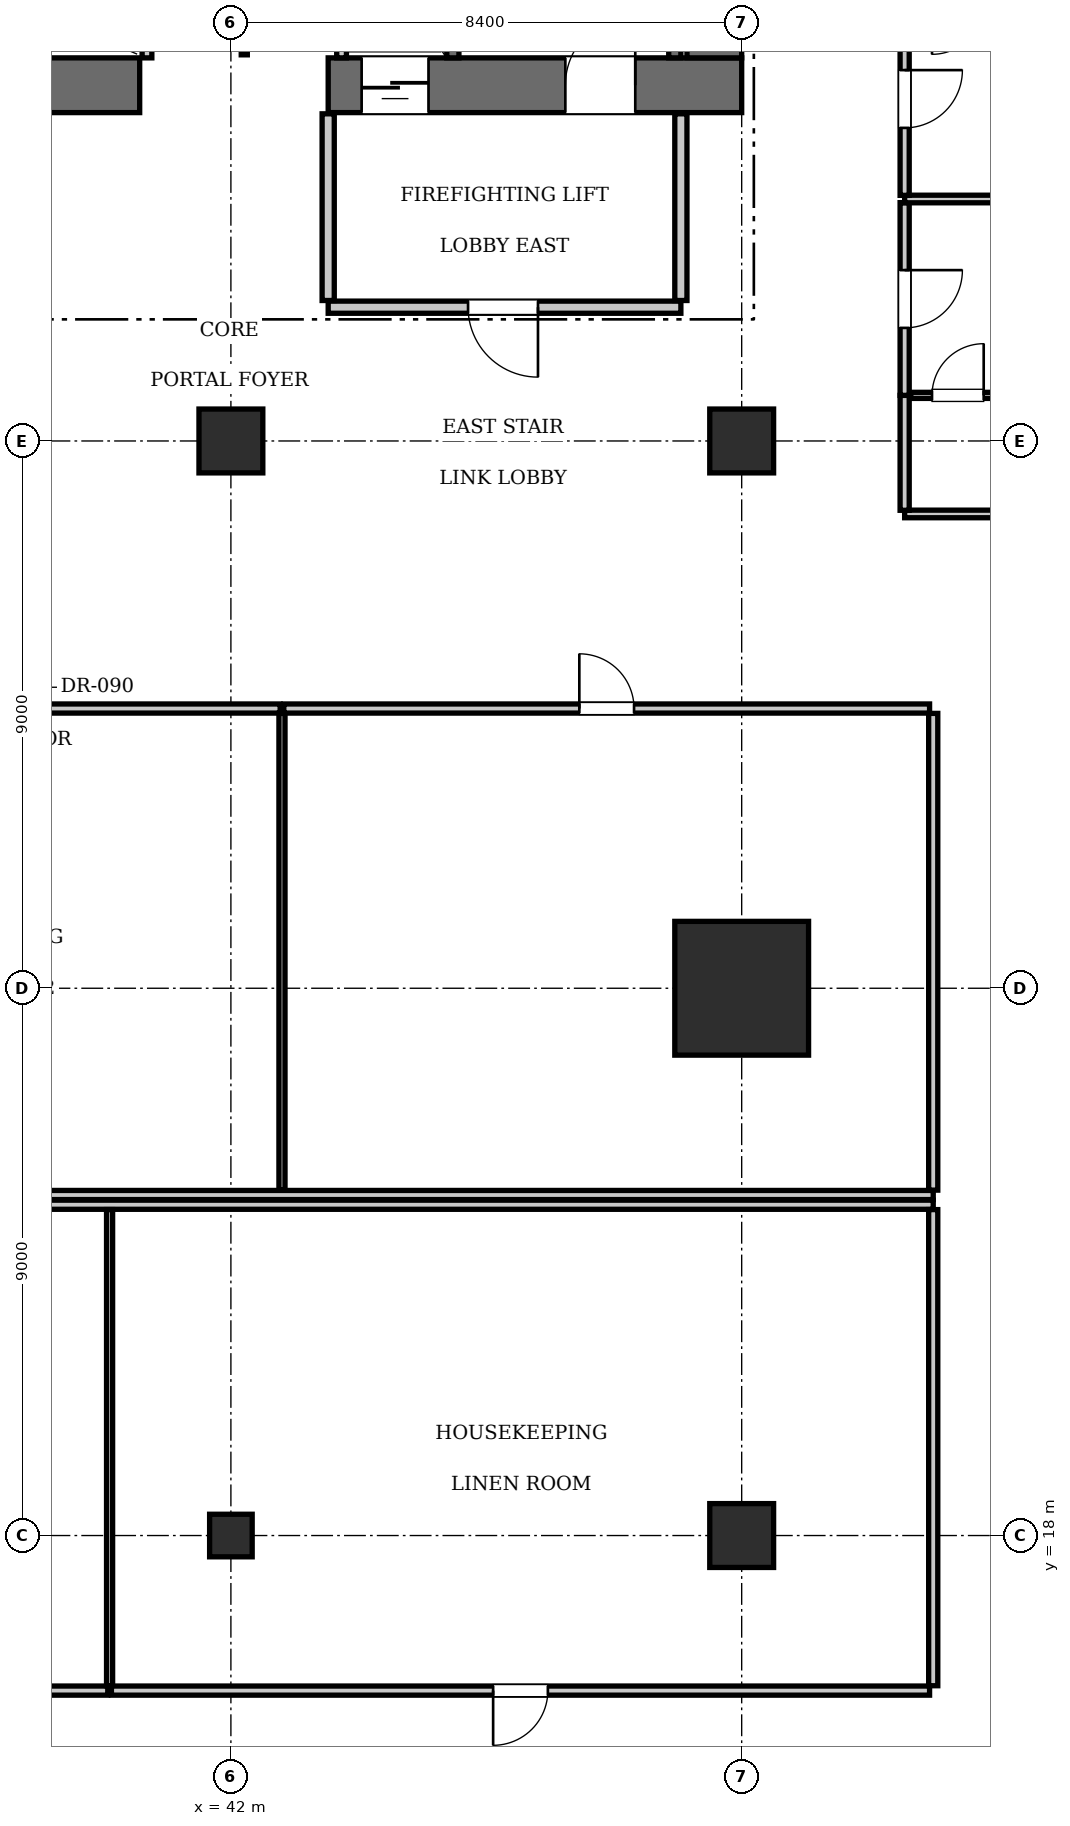
"""IFC4 building model, lengths in metres.
Left out: names, types, materials, properties, quantities, classifications, styles, units other than length and angle.
Written with IfcOpenShell. Run it as: python <this file> out.ifc"""

import sys

from ifc_helpers import new_model, si_unit, direction, frame, frame_2d, origin, origin_2d, place, context, subcontext, project, spatial, rectangle, i_section, extrude, element, fill, save


model = new_model("IFC4")
c1 = context("Model", 3, precision=1e-05, world=origin(), true_north=direction((0.0, 1.0)))
c2 = subcontext(c1, "Body", "Model", "MODEL_VIEW")
j1 = project(units=[si_unit("LENGTHUNIT", "METRE"), si_unit("PLANEANGLEUNIT", "RADIAN")], contexts=[c1])
p1 = place(None, origin())
s1 = spatial("IfcSite", under=j1, at=p1, CompositionType="ELEMENT")
p2 = place(p1, origin())
s2 = spatial("IfcBuilding", under=s1, at=p2, CompositionType="ELEMENT")
p3 = place(p2, frame((0.0, 0.0, 80.85)))
s3 = spatial("IfcBuildingStorey", under=s2, at=p3, CompositionType="ELEMENT", Elevation=80.85)
p4 = place(p3, frame((50.4, 27.0, 0.0), z_axis=(0.0, 0.0, 1.0), x_axis=(1.0, 0.0, 0.0)))
e1 = element("IfcColumn", 1, at=p4, inside=s3, PredefinedType="COLUMN", context=c2, shape_type="SweptSolid", body=[
    extrude(rectangle(XDim=2.2, YDim=2.2, at=origin_2d()), origin(), (0.0, 0.0, 1.0), 3.85),
])
p5 = place(p3, frame((35.1, 41.85, 0.0), z_axis=(0.0, 0.0, 1.0), x_axis=(1.0, 0.0, 0.0)))
e2 = element("IfcWall", 2, at=p5, inside=s3, PredefinedType="SHEAR", context=c2, shape_type="SweptSolid", body=[
    extrude(rectangle(XDim=5.4, YDim=0.9, at=frame_2d((2.7, 0.0))), origin(), (0.0, 0.0, 1.0), 3.85),
])
p6 = place(p3, frame((43.6, 41.85, 0.0), z_axis=(0.0, 0.0, 1.0), x_axis=(1.0, 0.0, 0.0)))
e3 = element("IfcWall", 3, at=p6, inside=s3, PredefinedType="SHEAR", context=c2, shape_type="SweptSolid", body=[
    extrude(rectangle(XDim=6.8, YDim=0.9, at=frame_2d((3.4, 0.0))), origin(), (0.0, 0.0, 1.0), 3.85),
])
p7 = place(p6, frame((3.9, 0.0, 0.0)))
e4 = element("IfcOpeningElement", 4, at=p7, cuts=e3, PredefinedType="OPENING", context=c2, shape_type="SweptSolid", body=[
    extrude(rectangle(XDim=1.15, YDim=2.15, at=frame_2d((0.575, 1.075))), frame((0.0, 0.46, 0.0), z_axis=(0.0, -1.0, 0.0), x_axis=(1.0, 0.0, 0.0)), (0.0, 0.0, 1.0), 0.92),
])
p8 = place(p6, frame((0.55, 0.0, 0.0)))
e5 = element("IfcOpeningElement", 5, at=p8, cuts=e3, PredefinedType="OPENING", context=c2, shape_type="SweptSolid", body=[
    extrude(rectangle(XDim=1.1, YDim=2.2, at=frame_2d((0.55, 1.1))), frame((0.0, 0.46, 0.0), z_axis=(0.0, -1.0, 0.0), x_axis=(1.0, 0.0, 0.0)), (0.0, 0.0, 1.0), 0.92),
])
p9 = place(p3, frame((49.95, 42.3, 0.0), z_axis=(0.0, 0.0, 1.0), x_axis=(0.0, 1.0, 0.0)))
e6 = element("IfcWall", 6, at=p9, inside=s3, PredefinedType="SHEAR", context=c2, shape_type="SweptSolid", body=[
    extrude(rectangle(XDim=1.6, YDim=0.9, at=frame_2d((0.8, 0.0))), origin(), (0.0, 0.0, 1.0), 3.85),
])
for number, where, z_axis, x_axis in (
    (7, (42.0, 36.0, 0.0), (0.0, 0.0, 1.0), (1.0, 0.0, 0.0)),
    (8, (50.4, 36.0, 0.0), (0.0, 0.0, 1.0), (1.0, 0.0, 0.0)),
    (9, (50.4, 18.0, 0.0), (0.0, 0.0, 1.0), (1.0, 0.0, 0.0)),
):
    element("IfcColumn", number, at=place(p3, frame(where, z_axis=z_axis, x_axis=x_axis)), inside=s3, PredefinedType="COLUMN", context=c2, shape_type="SweptSolid", body=[
        extrude(rectangle(XDim=1.05, YDim=1.05, at=origin_2d()), origin(), (0.0, 0.0, 1.0), 3.85),
    ])
p10 = place(p3, frame((42.0, 18.0, 0.0), z_axis=(0.0, 0.0, 1.0), x_axis=(1.0, 0.0, 0.0)))
e10 = element("IfcColumn", 10, at=p10, inside=s3, PredefinedType="COLUMN", context=c2, shape_type="SweptSolid", body=[
    extrude(i_section(OverallWidth=0.7, OverallDepth=0.7, WebThickness=0.028, FlangeThickness=0.044, at=origin_2d()), origin(), (0.0, 0.0, 1.0), 3.85),
])
p11 = place(p3, frame((45.65, 42.3, 0.0), z_axis=(0.0, 0.0, 1.0), x_axis=(0.0, 1.0, 0.0)))
e11 = element("IfcWall", 11, at=p11, inside=s3, PredefinedType="SOLIDWALL", context=c2, shape_type="SweptSolid", body=[
    extrude(rectangle(XDim=8.85, YDim=0.2, at=frame_2d((4.425, 0.0))), origin(), (0.0, 0.0, 1.0), 3.61),
])
p12 = place(p3, frame((49.3, 42.3, 0.0), z_axis=(0.0, 0.0, 1.0), x_axis=(0.0, 1.0, 0.0)))
e12 = element("IfcWall", 12, at=p12, inside=s3, PredefinedType="SOLIDWALL", context=c2, shape_type="SweptSolid", body=[
    extrude(rectangle(XDim=1.58, YDim=0.2, at=frame_2d((0.79, 0.0))), origin(), (0.0, 0.0, 1.0), 3.61),
])
p13 = place(p3, frame((43.82, 42.3, 0.0), z_axis=(0.0, 0.0, 1.0), x_axis=(0.0, 1.0, 0.0)))
e13 = element("IfcWall", 13, at=p13, inside=s3, PredefinedType="SOLIDWALL", context=c2, shape_type="SweptSolid", body=[
    extrude(rectangle(XDim=2.44, YDim=0.16, at=frame_2d((1.22, 0.0))), origin(), (0.0, 0.0, 1.0), 3.61),
])
p14 = place(p3, frame((40.62, 42.3, 0.0), z_axis=(0.0, 0.0, 1.0), x_axis=(0.0, 1.0, 0.0)))
e14 = element("IfcWall", 14, at=p14, inside=s3, PredefinedType="SOLIDWALL", context=c2, shape_type="SweptSolid", body=[
    extrude(rectangle(XDim=2.05, YDim=0.16, at=frame_2d((1.025, 0.0))), origin(), (0.0, 0.0, 1.0), 3.61),
])
p15 = place(p3, frame((43.6, 38.2, 0.0), z_axis=(0.0, 0.0, 1.0), x_axis=(1.0, 0.0, 0.0)))
e15 = element("IfcWall", 15, at=p15, inside=s3, PredefinedType="PARTITIONING", context=c2, shape_type="SweptSolid", body=[
    extrude(rectangle(XDim=5.8, YDim=0.2, at=frame_2d((2.9, 0.0))), origin(), (0.0, 0.0, 1.0), 3.61),
])
p16 = place(p15, frame((2.3, 0.0, 0.0)))
e16 = element("IfcOpeningElement", 16, at=p16, cuts=e15, PredefinedType="OPENING", context=c2, shape_type="SweptSolid", body=[
    extrude(rectangle(XDim=1.15, YDim=2.15, at=frame_2d((0.575, 1.075))), frame((0.0, 0.11, 0.0), z_axis=(0.0, -1.0, 0.0), x_axis=(1.0, 0.0, 0.0)), (0.0, 0.0, 1.0), 0.22),
])
for number, where, z_axis, x_axis in (
    (17, (43.6, 38.31, 0.0), (0.0, 0.0, 1.0), (0.0, 1.0, 0.0)),
    (18, (49.4, 38.31, 0.0), (0.0, 0.0, 1.0), (0.0, 1.0, 0.0)),
):
    element("IfcWall", number, at=place(p3, frame(where, z_axis=z_axis, x_axis=x_axis)), inside=s3, PredefinedType="PARTITIONING", context=c2, shape_type="SweptSolid", body=[
        extrude(rectangle(XDim=3.07, YDim=0.2, at=frame_2d((1.535, 0.0))), origin(), (0.0, 0.0, 1.0), 3.61),
    ])
p17 = place(p3, frame((42.22, 42.35, 0.0), z_axis=(0.0, 0.0, 1.0), x_axis=(0.0, 1.0, 0.0)))
e19 = element("IfcWall", 19, at=p17, inside=s3, PredefinedType="PARTITIONING", context=c2, shape_type="SweptSolid", body=[
    extrude(rectangle(XDim=2.61, YDim=0.1, at=frame_2d((1.305, 0.0))), origin(), (0.0, 0.0, 1.0), 3.61),
])
p18 = place(p17, frame((0.65, 0.0, 0.0)))
e20 = element("IfcOpeningElement", 20, at=p18, cuts=e19, PredefinedType="OPENING", context=c2, shape_type="SweptSolid", body=[
    extrude(rectangle(XDim=0.8, YDim=2.05, at=frame_2d((0.4, 1.025))), frame((0.0, 0.06, 0.0), z_axis=(0.0, -1.0, 0.0), x_axis=(1.0, 0.0, 0.0)), (0.0, 0.0, 1.0), 0.12),
])
p19 = place(p3, frame((22.05, 23.6, 0.0), z_axis=(0.0, 0.0, 1.0), x_axis=(1.0, 0.0, 0.0)))
e21 = element("IfcWall", 21, at=p19, inside=s3, PredefinedType="PARTITIONING", context=c2, shape_type="SweptSolid", body=[
    extrude(rectangle(XDim=31.5, YDim=0.15, at=frame_2d((15.75, 0.0))), origin(), (0.0, 0.0, 1.0), 3.61),
])
p20 = place(p3, frame((53.55, 23.68, 0.0), z_axis=(0.0, 0.0, 1.0), x_axis=(0.0, 1.0, 0.0)))
e22 = element("IfcWall", 22, at=p20, inside=s3, PredefinedType="PARTITIONING", context=c2, shape_type="SweptSolid", body=[
    extrude(rectangle(XDim=7.84, YDim=0.15, at=frame_2d((3.92, 0.0))), origin(), (0.0, 0.0, 1.0), 3.61),
])
p21 = place(p3, frame((34.05, 31.6, 0.0), z_axis=(0.0, 0.0, 1.0), x_axis=(1.0, 0.0, 0.0)))
e23 = element("IfcWall", 23, at=p21, inside=s3, PredefinedType="PARTITIONING", context=c2, shape_type="SweptSolid", body=[
    extrude(rectangle(XDim=8.76, YDim=0.15, at=frame_2d((4.38, 0.0))), origin(), (0.0, 0.0, 1.0), 3.61),
])
p22 = place(p21, frame((3.93, 0.0, 0.0)))
e24 = element("IfcOpeningElement", 24, at=p22, cuts=e23, PredefinedType="OPENING", context=c2, shape_type="SweptSolid", body=[
    extrude(rectangle(XDim=0.9, YDim=2.1, at=frame_2d((0.45, 1.05))), frame((0.0, 0.085, 0.0), z_axis=(0.0, -1.0, 0.0), x_axis=(1.0, 0.0, 0.0)), (0.0, 0.0, 1.0), 0.17),
])
p23 = place(p3, frame((42.84, 23.68, 0.0), z_axis=(0.0, 0.0, 1.0), x_axis=(0.0, 1.0, 0.0)))
e25 = element("IfcWall", 25, at=p23, inside=s3, PredefinedType="PARTITIONING", context=c2, shape_type="SweptSolid", body=[
    extrude(rectangle(XDim=7.84, YDim=0.1, at=frame_2d((3.92, 0.0))), origin(), (0.0, 0.0, 1.0), 3.61),
])
p24 = place(p3, frame((42.87, 31.6, 0.0), z_axis=(0.0, 0.0, 1.0), x_axis=(1.0, 0.0, 0.0)))
e26 = element("IfcWall", 26, at=p24, inside=s3, PredefinedType="PARTITIONING", context=c2, shape_type="SweptSolid", body=[
    extrude(rectangle(XDim=10.62, YDim=0.15, at=frame_2d((5.31, 0.0))), origin(), (0.0, 0.0, 1.0), 3.61),
])
p25 = place(p24, frame((4.86, 0.0, 0.0)))
e27 = element("IfcOpeningElement", 27, at=p25, cuts=e26, PredefinedType="OPENING", context=c2, shape_type="SweptSolid", body=[
    extrude(rectangle(XDim=0.9, YDim=2.1, at=frame_2d((0.45, 1.05))), frame((0.0, 0.085, 0.0), z_axis=(0.0, -1.0, 0.0), x_axis=(1.0, 0.0, 0.0)), (0.0, 0.0, 1.0), 0.17),
])
p26 = place(p3, frame((22.05, 23.44, 0.0), z_axis=(0.0, 0.0, 1.0), x_axis=(1.0, 0.0, 0.0)))
e28 = element("IfcWall", 28, at=p26, inside=s3, PredefinedType="PARTITIONING", context=c2, shape_type="SweptSolid", body=[
    extrude(rectangle(XDim=31.5, YDim=0.15, at=frame_2d((15.75, 0.0))), origin(), (0.0, 0.0, 1.0), 3.61),
])
p27 = place(p3, frame((53.55, 15.53, 0.0), z_axis=(0.0, 0.0, 1.0), x_axis=(0.0, 1.0, 0.0)))
e29 = element("IfcWall", 29, at=p27, inside=s3, PredefinedType="PARTITIONING", context=c2, shape_type="SweptSolid", body=[
    extrude(rectangle(XDim=7.83, YDim=0.15, at=frame_2d((3.915, 0.0))), origin(), (0.0, 0.0, 1.0), 3.61),
])
p28 = place(p3, frame((29.325, 15.45, 0.0), z_axis=(0.0, 0.0, 1.0), x_axis=(1.0, 0.0, 0.0)))
e30 = element("IfcWall", 30, at=p28, inside=s3, PredefinedType="PARTITIONING", context=c2, shape_type="SweptSolid", body=[
    extrude(rectangle(XDim=10.65, YDim=0.15, at=frame_2d((5.325, 0.0))), origin(), (0.0, 0.0, 1.0), 3.61),
])
p29 = place(p28, frame((4.875, 0.0, 0.0)))
e31 = element("IfcOpeningElement", 31, at=p29, cuts=e30, PredefinedType="OPENING", context=c2, shape_type="SweptSolid", body=[
    extrude(rectangle(XDim=0.9, YDim=2.1, at=frame_2d((0.45, 1.05))), frame((0.0, 0.085, 0.0), z_axis=(0.0, -1.0, 0.0), x_axis=(1.0, 0.0, 0.0)), (0.0, 0.0, 1.0), 0.17),
])
p30 = place(p3, frame((40.005, 15.53, 0.0), z_axis=(0.0, 0.0, 1.0), x_axis=(0.0, 1.0, 0.0)))
e32 = element("IfcWall", 32, at=p30, inside=s3, PredefinedType="PARTITIONING", context=c2, shape_type="SweptSolid", body=[
    extrude(rectangle(XDim=7.83, YDim=0.1, at=frame_2d((3.915, 0.0))), origin(), (0.0, 0.0, 1.0), 3.61),
])
p31 = place(p3, frame((40.035, 15.45, 0.0), z_axis=(0.0, 0.0, 1.0), x_axis=(1.0, 0.0, 0.0)))
e33 = element("IfcWall", 33, at=p31, inside=s3, PredefinedType="PARTITIONING", context=c2, shape_type="SweptSolid", body=[
    extrude(rectangle(XDim=13.455, YDim=0.15, at=frame_2d((6.728, 0.0))), origin(), (0.0, 0.0, 1.0), 3.61),
])
p32 = place(p31, frame((6.278, 0.0, 0.0)))
e34 = element("IfcOpeningElement", 34, at=p32, cuts=e33, PredefinedType="OPENING", context=c2, shape_type="SweptSolid", body=[
    extrude(rectangle(XDim=0.9, YDim=2.1, at=frame_2d((0.45, 1.05))), frame((0.0, 0.085, 0.0), z_axis=(0.0, -1.0, 0.0), x_axis=(1.0, 0.0, 0.0)), (0.0, 0.0, 1.0), 0.17),
])
p33 = place(p3, frame((53.08, 34.8, 0.0), z_axis=(0.0, 0.0, 1.0), x_axis=(1.0, 0.0, 0.0)))
e35 = element("IfcWall", 35, at=p33, inside=s3, PredefinedType="PARTITIONING", context=c2, shape_type="SweptSolid", body=[
    extrude(rectangle(XDim=11.62, YDim=0.125, at=frame_2d((5.81, 0.0))), origin(), (0.0, 0.0, 1.0), 3.61),
])
p34 = place(p3, frame((53.08, 34.86, 0.0), z_axis=(0.0, 0.0, 1.0), x_axis=(0.0, 1.0, 0.0)))
e36 = element("IfcWall", 36, at=p34, inside=s3, PredefinedType="PARTITIONING", context=c2, shape_type="SweptSolid", body=[
    extrude(rectangle(XDim=1.89, YDim=0.15, at=frame_2d((0.945, 0.0))), origin(), (0.0, 0.0, 1.0), 3.61),
])
p35 = place(p3, frame((53.08, 36.75, 0.0), z_axis=(0.0, 0.0, 1.0), x_axis=(0.0, 1.0, 0.0)))
e37 = element("IfcWall", 37, at=p35, inside=s3, PredefinedType="PARTITIONING", context=c2, shape_type="SweptSolid", body=[
    extrude(rectangle(XDim=3.169, YDim=0.15, at=frame_2d((1.584, 0.0))), origin(), (0.0, 0.0, 1.0), 3.61),
])
p36 = place(p35, frame((1.11, 0.0, 0.0)))
e38 = element("IfcOpeningElement", 38, at=p36, cuts=e37, PredefinedType="OPENING", context=c2, shape_type="SweptSolid", body=[
    extrude(rectangle(XDim=0.95, YDim=2.15, at=frame_2d((0.475, 1.075))), frame((0.0, 0.085, 0.0), z_axis=(0.0, -1.0, 0.0), x_axis=(1.0, 0.0, 0.0)), (0.0, 0.0, 1.0), 0.17),
])
p37 = place(p3, frame((53.18, 36.75, 0.0), z_axis=(0.0, 0.0, 1.0), x_axis=(1.0, 0.0, 0.0)))
e39 = element("IfcWall", 39, at=p37, inside=s3, PredefinedType="PARTITIONING", context=c2, shape_type="SweptSolid", body=[
    extrude(rectangle(XDim=2.3, YDim=0.1, at=frame_2d((1.15, 0.0))), origin(), (0.0, 0.0, 1.0), 3.61),
])
p38 = place(p37, frame((0.35, 0.0, 0.0)))
e40 = element("IfcOpeningElement", 40, at=p38, cuts=e39, PredefinedType="OPENING", context=c2, shape_type="SweptSolid", body=[
    extrude(rectangle(XDim=0.85, YDim=2.1, at=frame_2d((0.425, 1.05))), frame((0.0, 0.06, 0.0), z_axis=(0.0, -1.0, 0.0), x_axis=(1.0, 0.0, 0.0)), (0.0, 0.0, 1.0), 0.12),
])
p39 = place(p3, frame((53.08, 39.979, 0.0), z_axis=(0.0, 0.0, 1.0), x_axis=(1.0, 0.0, 0.0)))
e41 = element("IfcWall", 41, at=p39, inside=s3, PredefinedType="PARTITIONING", context=c2, shape_type="SweptSolid", body=[
    extrude(rectangle(XDim=11.62, YDim=0.125, at=frame_2d((5.81, 0.0))), origin(), (0.0, 0.0, 1.0), 3.61),
])
p40 = place(p3, frame((53.08, 40.039, 0.0), z_axis=(0.0, 0.0, 1.0), x_axis=(0.0, 1.0, 0.0)))
e42 = element("IfcWall", 42, at=p40, inside=s3, PredefinedType="PARTITIONING", context=c2, shape_type="SweptSolid", body=[
    extrude(rectangle(XDim=3.169, YDim=0.15, at=frame_2d((1.584, 0.0))), origin(), (0.0, 0.0, 1.0), 3.61),
])
p41 = place(p40, frame((1.11, 0.0, 0.0)))
e43 = element("IfcOpeningElement", 43, at=p41, cuts=e42, PredefinedType="OPENING", context=c2, shape_type="SweptSolid", body=[
    extrude(rectangle(XDim=0.95, YDim=2.15, at=frame_2d((0.475, 1.075))), frame((0.0, 0.085, 0.0), z_axis=(0.0, -1.0, 0.0), x_axis=(1.0, 0.0, 0.0)), (0.0, 0.0, 1.0), 0.17),
])
p42 = place(p7, origin())
e44 = element("IfcDoor", 44, at=p42, inside=s3, OperationType="SINGLE_SWING_RIGHT", PredefinedType="DOOR", context=c2, shape_type="SweptSolid", body=[
    extrude(rectangle(XDim=1.15, YDim=2.15, at=frame_2d((0.575, 1.075))), frame((0.0, 0.025, 0.0), z_axis=(0.0, -1.0, 0.0), x_axis=(1.0, 0.0, 0.0)), (0.0, 0.0, 1.0), 0.05),
])
fill(e4, e44)
p43 = place(p8, frame((1.1, 0.0, 0.0), z_axis=(0.0, 0.0, 1.0), x_axis=(-1.0, 0.0, 0.0)))
e45 = element("IfcDoor", 45, at=p43, inside=s3, OperationType="SLIDING_TO_LEFT", PredefinedType="DOOR", context=c2, shape_type="SweptSolid", body=[
    extrude(rectangle(XDim=1.1, YDim=2.2, at=frame_2d((0.55, 1.1))), frame((0.0, 0.025, 0.0), z_axis=(0.0, -1.0, 0.0), x_axis=(1.0, 0.0, 0.0)), (0.0, 0.0, 1.0), 0.05),
])
fill(e5, e45)
p44 = place(p16, frame((1.15, 0.0, 0.0), z_axis=(0.0, 0.0, 1.0), x_axis=(-1.0, 0.0, 0.0)))
e46 = element("IfcDoor", 46, at=p44, inside=s3, OperationType="SINGLE_SWING_LEFT", PredefinedType="DOOR", context=c2, shape_type="SweptSolid", body=[
    extrude(rectangle(XDim=1.15, YDim=2.15, at=frame_2d((0.575, 1.075))), frame((0.0, 0.025, 0.0), z_axis=(0.0, -1.0, 0.0), x_axis=(1.0, 0.0, 0.0)), (0.0, 0.0, 1.0), 0.05),
])
fill(e16, e46)
p45 = place(p25, origin())
e47 = element("IfcDoor", 47, at=p45, inside=s3, OperationType="SINGLE_SWING_LEFT", PredefinedType="DOOR", context=c2, shape_type="SweptSolid", body=[
    extrude(rectangle(XDim=0.9, YDim=2.1, at=frame_2d((0.45, 1.05))), frame((0.0, 0.025, 0.0), z_axis=(0.0, -1.0, 0.0), x_axis=(1.0, 0.0, 0.0)), (0.0, 0.0, 1.0), 0.05),
])
fill(e27, e47)
p46 = place(p32, frame((0.9, 0.0, 0.0), z_axis=(0.0, 0.0, 1.0), x_axis=(-1.0, 0.0, 0.0)))
e48 = element("IfcDoor", 48, at=p46, inside=s3, OperationType="SINGLE_SWING_RIGHT", PredefinedType="DOOR", context=c2, shape_type="SweptSolid", body=[
    extrude(rectangle(XDim=0.9, YDim=2.1, at=frame_2d((0.45, 1.05))), frame((0.0, 0.025, 0.0), z_axis=(0.0, -1.0, 0.0), x_axis=(1.0, 0.0, 0.0)), (0.0, 0.0, 1.0), 0.05),
])
fill(e34, e48)
p47 = place(p38, origin())
e49 = element("IfcDoor", 49, at=p47, inside=s3, OperationType="SINGLE_SWING_RIGHT", PredefinedType="DOOR", context=c2, shape_type="SweptSolid", body=[
    extrude(rectangle(XDim=0.85, YDim=2.1, at=frame_2d((0.425, 1.05))), frame((0.0, 0.025, 0.0), z_axis=(0.0, -1.0, 0.0), x_axis=(1.0, 0.0, 0.0)), (0.0, 0.0, 1.0), 0.05),
])
fill(e40, e49)
p48 = place(p36, frame((0.95, 0.0, 0.0), z_axis=(0.0, 0.0, 1.0), x_axis=(-1.0, 0.0, 0.0)))
e50 = element("IfcDoor", 50, at=p48, inside=s3, OperationType="SINGLE_SWING_LEFT", PredefinedType="DOOR", context=c2, shape_type="SweptSolid", body=[
    extrude(rectangle(XDim=0.95, YDim=2.15, at=frame_2d((0.475, 1.075))), frame((0.0, 0.025, 0.0), z_axis=(0.0, -1.0, 0.0), x_axis=(1.0, 0.0, 0.0)), (0.0, 0.0, 1.0), 0.05),
])
fill(e38, e50)
p49 = place(p41, frame((0.95, 0.0, 0.0), z_axis=(0.0, 0.0, 1.0), x_axis=(-1.0, 0.0, 0.0)))
e51 = element("IfcDoor", 51, at=p49, inside=s3, OperationType="SINGLE_SWING_LEFT", PredefinedType="DOOR", context=c2, shape_type="SweptSolid", body=[
    extrude(rectangle(XDim=0.95, YDim=2.15, at=frame_2d((0.475, 1.075))), frame((0.0, 0.025, 0.0), z_axis=(0.0, -1.0, 0.0), x_axis=(1.0, 0.0, 0.0)), (0.0, 0.0, 1.0), 0.05),
])
fill(e43, e51)
save(model, sys.argv[1])
